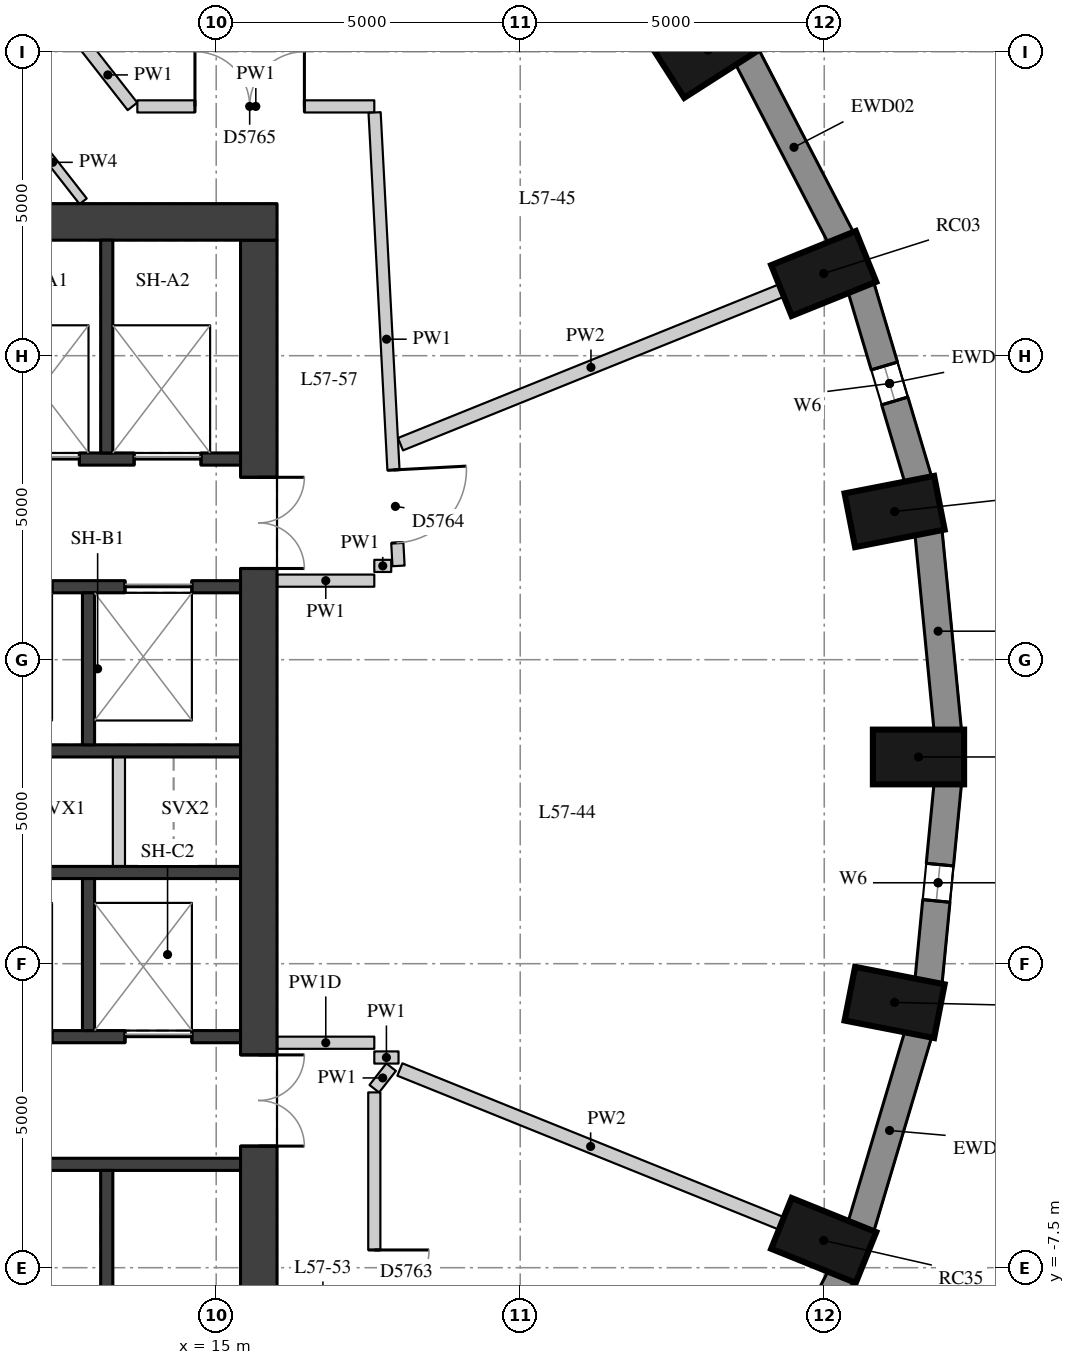
"""IFC4 building model, lengths in metres.
Left out: names, types, materials, properties, quantities, classifications, styles, units other than length and angle.
Written with IfcOpenShell. Run it as: python <this file> out.ifc"""

import sys

from ifc_helpers import new_model, si_unit, direction, frame, frame_2d, origin, origin_2d, place, context, subcontext, project, spatial, rectangle, extrude, element, fill, save


model = new_model("IFC4")
c1 = context("Model", 3, precision=1e-05, world=origin(), true_north=direction((0.0, 1.0)))
c2 = subcontext(c1, "Body", "Model", "MODEL_VIEW")
j1 = project(units=[si_unit("LENGTHUNIT", "METRE"), si_unit("PLANEANGLEUNIT", "RADIAN")], contexts=[c1])
p1 = place(None, origin())
s1 = spatial("IfcSite", under=j1, at=p1, CompositionType="ELEMENT")
p2 = place(p1, origin())
s2 = spatial("IfcBuilding", under=s1, at=p2, CompositionType="ELEMENT")
p3 = place(p2, frame((0.0, 0.0, 202.4)))
s3 = spatial("IfcBuildingStorey", under=s2, at=p3, CompositionType="ELEMENT", Elevation=202.4)
for number, where, z_axis, x_axis in (
    (1, (26.55, 0.9, 0.0), (0.0, 0.0, 1.0), (1.0, 0.0, 0.0)),
    (2, (26.157, 4.937, 0.0), (0.0, 0.0, 1.0), (0.981, 0.192, 0.0)),
    (3, (24.991, 8.852, 0.0), (0.0, 0.0, 1.0), (0.927, 0.374, 0.0)),
    (4, (23.087, 12.525, 0.0), (0.0, 0.0, 1.0), (0.842, 0.539, 0.0)),
    (5, (24.991, -7.052, 0.0), (0.0, 0.0, 1.0), (0.927, -0.374, 0.0)),
    (6, (26.157, -3.137, 0.0), (0.0, 0.0, 1.0), (0.981, -0.192, 0.0)),
):
    element("IfcColumn", number, at=place(p3, frame(where, z_axis=z_axis, x_axis=x_axis)), inside=s3, PredefinedType="COLUMN", context=c2, shape_type="SweptSolid", body=[
        extrude(rectangle(XDim=1.5, YDim=0.9, at=origin_2d()), origin(), (0.0, 0.0, 1.0), 3.3),
    ])
p4 = place(p3, frame((27.032, 1.33, 0.0), z_axis=(0.0, 0.0, 1.0), x_axis=(-0.096824116835, 0.995301507283, 0.0)))
e7 = element("IfcWall", 7, at=p4, inside=s3, PredefinedType="SOLIDWALL", context=c2, shape_type="SweptSolid", body=[
    extrude(rectangle(XDim=3.293, YDim=0.45, at=frame_2d((1.646, 0.0))), origin(), (0.0, 0.0, 1.0), 3.02),
])
p5 = place(p3, frame((26.548, 5.452, 0.0), z_axis=(0.0, 0.0, 1.0), x_axis=(-0.285444972963, 0.958395099847, 0.0)))
e8 = element("IfcWall", 8, at=p5, inside=s3, PredefinedType="SOLIDWALL", context=c2, shape_type="SweptSolid", body=[
    extrude(rectangle(XDim=3.32, YDim=0.45, at=frame_2d((1.66, 0.0))), origin(), (0.0, 0.0, 1.0), 3.02),
])
p6 = place(p5, frame((1.36, 0.0, 0.4)))
e9 = element("IfcOpeningElement", 9, at=p6, cuts=e8, PredefinedType="OPENING", context=c2, shape_type="SweptSolid", body=[
    extrude(rectangle(XDim=0.6, YDim=1.75, at=frame_2d((0.3, 0.875))), frame((0.0, 0.235, 0.0), z_axis=(0.0, -1.0, 0.0), x_axis=(1.0, 0.0, 0.0)), (0.0, 0.0, 1.0), 0.47),
])
p7 = place(p3, frame((25.278, 9.432, 0.0), z_axis=(0.0, 0.0, 1.0), x_axis=(-0.460175500475, 0.887827972505, 0.0)))
e10 = element("IfcWall", 10, at=p7, inside=s3, PredefinedType="SOLIDWALL", context=c2, shape_type="SweptSolid", body=[
    extrude(rectangle(XDim=3.371, YDim=0.45, at=frame_2d((1.685, 0.0))), origin(), (0.0, 0.0, 1.0), 3.02),
])
p8 = place(p3, frame((23.727, -10.624, 0.0), z_axis=(0.0, 0.0, 1.0), x_axis=(0.460175500475, 0.887827972505, 0.0)))
e11 = element("IfcWall", 11, at=p8, inside=s3, PredefinedType="SOLIDWALL", context=c2, shape_type="SweptSolid", body=[
    extrude(rectangle(XDim=3.371, YDim=0.45, at=frame_2d((1.685, 0.0))), origin(), (0.0, 0.0, 1.0), 3.02),
])
p9 = place(p8, frame((1.385, 0.0, 0.4)))
e12 = element("IfcOpeningElement", 12, at=p9, cuts=e11, PredefinedType="OPENING", context=c2, shape_type="SweptSolid", body=[
    extrude(rectangle(XDim=0.6, YDim=1.75, at=frame_2d((0.3, 0.875))), frame((0.0, 0.235, 0.0), z_axis=(0.0, -1.0, 0.0), x_axis=(1.0, 0.0, 0.0)), (0.0, 0.0, 1.0), 0.47),
])
p10 = place(p3, frame((25.6, -6.834, 0.0), z_axis=(0.0, 0.0, 1.0), x_axis=(0.285444972963, 0.958395099847, 0.0)))
e13 = element("IfcWall", 13, at=p10, inside=s3, PredefinedType="SOLIDWALL", context=c2, shape_type="SweptSolid", body=[
    extrude(rectangle(XDim=3.32, YDim=0.45, at=frame_2d((1.66, 0.0))), origin(), (0.0, 0.0, 1.0), 3.02),
])
p11 = place(p3, frame((26.713, -2.808, 0.0), z_axis=(0.0, 0.0, 1.0), x_axis=(0.096816972749, 0.995302202242, 0.0)))
e14 = element("IfcWall", 14, at=p11, inside=s3, PredefinedType="SOLIDWALL", context=c2, shape_type="SweptSolid", body=[
    extrude(rectangle(XDim=3.293, YDim=0.45, at=frame_2d((1.646, 0.0))), origin(), (0.0, 0.0, 1.0), 3.02),
])
p12 = place(p11, frame((1.347, 0.0, 0.4)))
e15 = element("IfcOpeningElement", 15, at=p12, cuts=e14, PredefinedType="OPENING", context=c2, shape_type="SweptSolid", body=[
    extrude(rectangle(XDim=0.6, YDim=1.75, at=frame_2d((0.3, 0.875))), frame((0.0, 0.235, 0.0), z_axis=(0.0, -1.0, 0.0), x_axis=(1.0, 0.0, 0.0)), (0.0, 0.0, 1.0), 0.47),
])
p13 = place(p3, frame((15.7, -9.4, 0.0), z_axis=(0.0, 0.0, 1.0), x_axis=(0.0, 1.0, 0.0)))
e16 = element("IfcWall", 16, at=p13, inside=s3, PredefinedType="SHEAR", context=c2, shape_type="SweptSolid", body=[
    extrude(rectangle(XDim=18.8, YDim=0.6, at=frame_2d((9.4, 0.0))), origin(), (0.0, 0.0, 1.0), 3.02),
])
p14 = place(p13, frame((13.4, 0.0, 0.0)))
e17 = element("IfcOpeningElement", 17, at=p14, cuts=e16, PredefinedType="OPENING", context=c2, shape_type="SweptSolid", body=[
    extrude(rectangle(XDim=1.5, YDim=2.1, at=frame_2d((0.75, 1.05))), frame((0.0, 0.31, 0.0), z_axis=(0.0, -1.0, 0.0), x_axis=(1.0, 0.0, 0.0)), (0.0, 0.0, 1.0), 0.62),
])
p15 = place(p13, frame((3.9, 0.0, 0.0)))
e18 = element("IfcOpeningElement", 18, at=p15, cuts=e16, PredefinedType="OPENING", context=c2, shape_type="SweptSolid", body=[
    extrude(rectangle(XDim=1.5, YDim=2.1, at=frame_2d((0.75, 1.05))), frame((0.0, 0.31, 0.0), z_axis=(0.0, -1.0, 0.0), x_axis=(1.0, 0.0, 0.0)), (0.0, 0.0, 1.0), 0.62),
])
p16 = place(p3, frame((4.0, 9.7, 0.0), z_axis=(0.0, 0.0, 1.0), x_axis=(1.0, 0.0, 0.0)))
e19 = element("IfcWall", 19, at=p16, inside=s3, PredefinedType="SHEAR", context=c2, shape_type="SweptSolid", body=[
    extrude(rectangle(XDim=12.0, YDim=0.6, at=frame_2d((6.0, 0.0))), origin(), (0.0, 0.0, 1.0), 3.02),
])
p17 = place(p3, frame((4.6, 5.8, 0.0), z_axis=(0.0, 0.0, 1.0), x_axis=(1.0, 0.0, 0.0)))
e20 = element("IfcWall", 20, at=p17, inside=s3, PredefinedType="SHEAR", context=c2, shape_type="SweptSolid", body=[
    extrude(rectangle(XDim=10.8, YDim=0.2, at=frame_2d((5.4, 0.0))), origin(), (0.0, 0.0, 1.0), 3.02),
])
p18 = place(p17, frame((7.05, 0.0, 0.0)))
e21 = element("IfcOpeningElement", 21, at=p18, cuts=e20, PredefinedType="OPENING", context=c2, shape_type="SweptSolid", body=[
    extrude(rectangle(XDim=1.1, YDim=2.1, at=frame_2d((0.55, 1.05))), frame((0.0, 0.11, 0.0), z_axis=(0.0, -1.0, 0.0), x_axis=(1.0, 0.0, 0.0)), (0.0, 0.0, 1.0), 0.22),
])
p19 = place(p17, frame((9.05, 0.0, 0.0)))
e22 = element("IfcOpeningElement", 22, at=p19, cuts=e20, PredefinedType="OPENING", context=c2, shape_type="SweptSolid", body=[
    extrude(rectangle(XDim=1.1, YDim=2.1, at=frame_2d((0.55, 1.05))), frame((0.0, 0.11, 0.0), z_axis=(0.0, -1.0, 0.0), x_axis=(1.0, 0.0, 0.0)), (0.0, 0.0, 1.0), 0.22),
])
p20 = place(p3, frame((4.6, 3.7, 0.0), z_axis=(0.0, 0.0, 1.0), x_axis=(1.0, 0.0, 0.0)))
e23 = element("IfcWall", 23, at=p20, inside=s3, PredefinedType="SHEAR", context=c2, shape_type="SweptSolid", body=[
    extrude(rectangle(XDim=10.8, YDim=0.2, at=frame_2d((5.4, 0.0))), origin(), (0.0, 0.0, 1.0), 3.02),
])
p21 = place(p20, frame((6.6, 0.0, 0.0)))
e24 = element("IfcOpeningElement", 24, at=p21, cuts=e23, PredefinedType="OPENING", context=c2, shape_type="SweptSolid", body=[
    extrude(rectangle(XDim=1.1, YDim=2.1, at=frame_2d((0.55, 1.05))), frame((0.0, 0.11, 0.0), z_axis=(0.0, -1.0, 0.0), x_axis=(1.0, 0.0, 0.0)), (0.0, 0.0, 1.0), 0.22),
])
p22 = place(p20, frame((8.9, 0.0, 0.0)))
e25 = element("IfcOpeningElement", 25, at=p22, cuts=e23, PredefinedType="OPENING", context=c2, shape_type="SweptSolid", body=[
    extrude(rectangle(XDim=1.1, YDim=2.1, at=frame_2d((0.55, 1.05))), frame((0.0, 0.11, 0.0), z_axis=(0.0, -1.0, 0.0), x_axis=(1.0, 0.0, 0.0)), (0.0, 0.0, 1.0), 0.22),
])
for number, where, z_axis, x_axis in (
    (26, (4.6, 1.0, 0.0), (0.0, 0.0, 1.0), (1.0, 0.0, 0.0)),
    (27, (4.6, -1.0, 0.0), (0.0, 0.0, 1.0), (1.0, 0.0, 0.0)),
):
    element("IfcWall", number, at=place(p3, frame(where, z_axis=z_axis, x_axis=x_axis)), inside=s3, PredefinedType="SHEAR", context=c2, shape_type="SweptSolid", body=[
        extrude(rectangle(XDim=10.8, YDim=0.2, at=frame_2d((5.4, 0.0))), origin(), (0.0, 0.0, 1.0), 3.02),
    ])
p23 = place(p3, frame((4.6, -3.7, 0.0), z_axis=(0.0, 0.0, 1.0), x_axis=(1.0, 0.0, 0.0)))
e28 = element("IfcWall", 28, at=p23, inside=s3, PredefinedType="SHEAR", context=c2, shape_type="SweptSolid", body=[
    extrude(rectangle(XDim=10.8, YDim=0.2, at=frame_2d((5.4, 0.0))), origin(), (0.0, 0.0, 1.0), 3.02),
])
p24 = place(p23, frame((6.6, 0.0, 0.0)))
e29 = element("IfcOpeningElement", 29, at=p24, cuts=e28, PredefinedType="OPENING", context=c2, shape_type="SweptSolid", body=[
    extrude(rectangle(XDim=1.1, YDim=2.1, at=frame_2d((0.55, 1.05))), frame((0.0, 0.11, 0.0), z_axis=(0.0, -1.0, 0.0), x_axis=(1.0, 0.0, 0.0)), (0.0, 0.0, 1.0), 0.22),
])
p25 = place(p23, frame((8.9, 0.0, 0.0)))
e30 = element("IfcOpeningElement", 30, at=p25, cuts=e28, PredefinedType="OPENING", context=c2, shape_type="SweptSolid", body=[
    extrude(rectangle(XDim=1.1, YDim=2.1, at=frame_2d((0.55, 1.05))), frame((0.0, 0.11, 0.0), z_axis=(0.0, -1.0, 0.0), x_axis=(1.0, 0.0, 0.0)), (0.0, 0.0, 1.0), 0.22),
])
p26 = place(p3, frame((4.6, -5.8, 0.0), z_axis=(0.0, 0.0, 1.0), x_axis=(1.0, 0.0, 0.0)))
e31 = element("IfcWall", 31, at=p26, inside=s3, PredefinedType="SHEAR", context=c2, shape_type="SweptSolid", body=[
    extrude(rectangle(XDim=10.8, YDim=0.2, at=frame_2d((5.4, 0.0))), origin(), (0.0, 0.0, 1.0), 3.02),
])
for number, where, z_axis, x_axis in (
    (32, (13.2, 5.9, 0.0), (0.0, 0.0, 1.0), (0.0, 1.0, 0.0)),
    (33, (13.2, -9.4, 0.0), (0.0, 0.0, 1.0), (0.0, 1.0, 0.0)),
):
    element("IfcWall", number, at=place(p3, frame(where, z_axis=z_axis, x_axis=x_axis)), inside=s3, PredefinedType="SHEAR", context=c2, shape_type="SweptSolid", body=[
        extrude(rectangle(XDim=3.5, YDim=0.2, at=frame_2d((1.75, 0.0))), origin(), (0.0, 0.0, 1.0), 3.02),
    ])
for number, where, z_axis, x_axis in (
    (34, (12.9, 1.1, 0.0), (0.0, 0.0, 1.0), (0.0, 1.0, 0.0)),
    (35, (12.9, -3.6, 0.0), (0.0, 0.0, 1.0), (0.0, 1.0, 0.0)),
):
    element("IfcWall", number, at=place(p3, frame(where, z_axis=z_axis, x_axis=x_axis)), inside=s3, PredefinedType="SHEAR", context=c2, shape_type="SweptSolid", body=[
        extrude(rectangle(XDim=2.5, YDim=0.2, at=frame_2d((1.25, 0.0))), origin(), (0.0, 0.0, 1.0), 3.02),
    ])
p27 = place(p3, frame((13.4, -0.9, 0.0), z_axis=(0.0, 0.0, 1.0), x_axis=(0.0, 1.0, 0.0)))
e36 = element("IfcWall", 36, at=p27, inside=s3, PredefinedType="PARTITIONING", context=c2, shape_type="SweptSolid", body=[
    extrude(rectangle(XDim=1.8, YDim=0.2, at=frame_2d((0.9, 0.0))), origin(), (0.0, 0.0, 1.0), 3.02),
])
p28 = place(p3, frame((17.6, -4.043, 0.0), z_axis=(0.0, 0.0, 1.0), x_axis=(1.0, 0.0, 0.0)))
e37 = element("IfcWall", 37, at=p28, inside=s3, PredefinedType="PARTITIONING", context=c2, shape_type="SweptSolid", body=[
    extrude(rectangle(XDim=0.398, YDim=0.2, at=frame_2d((0.199, 0.0))), origin(), (0.0, 0.0, 1.0), 3.02),
])
p29 = place(p3, frame((17.876, -4.201, 0.0), z_axis=(0.0, 0.0, 1.0), x_axis=(-0.61405326993, -0.789264582816, 0.0)))
e38 = element("IfcWall", 38, at=p29, inside=s3, PredefinedType="PARTITIONING", context=c2, shape_type="SweptSolid", body=[
    extrude(rectangle(XDim=0.45, YDim=0.2, at=frame_2d((0.225, 0.0))), origin(), (0.0, 0.0, 1.0), 3.02),
])
p30 = place(p3, frame((17.6, -4.617, 0.0), z_axis=(0.0, 0.0, 1.0), x_axis=(0.0, -1.0, 0.0)))
e39 = element("IfcWall", 39, at=p30, inside=s3, PredefinedType="PARTITIONING", context=c2, shape_type="SweptSolid", body=[
    extrude(rectangle(XDim=6.983, YDim=0.2, at=frame_2d((3.492, 0.0))), origin(), (0.0, 0.0, 1.0), 3.02),
])
p31 = place(p30, frame((2.592, 0.0, 0.0)))
e40 = element("IfcOpeningElement", 40, at=p31, cuts=e39, PredefinedType="OPENING", context=c2, shape_type="SweptSolid", body=[
    extrude(rectangle(XDim=1.8, YDim=2.1, at=frame_2d((0.9, 1.05))), frame((0.0, 0.11, 0.0), z_axis=(0.0, -1.0, 0.0), x_axis=(1.0, 0.0, 0.0)), (0.0, 0.0, 1.0), 0.22),
])
p32 = place(p3, frame((12.812, 12.636, 0.0), z_axis=(0.0, 0.0, 1.0), x_axis=(0.616123044723, -0.787649918277, 0.0)))
e41 = element("IfcWall", 41, at=p32, inside=s3, PredefinedType="PARTITIONING", context=c2, shape_type="SweptSolid", body=[
    extrude(rectangle(XDim=1.315, YDim=0.2, at=frame_2d((0.658, 0.0))), origin(), (0.0, 0.0, 1.0), 3.02),
])
p33 = place(p3, frame((13.703, 11.6, 0.0), z_axis=(0.0, 0.0, 1.0), x_axis=(1.0, 0.0, 0.0)))
e42 = element("IfcWall", 42, at=p33, inside=s3, PredefinedType="PARTITIONING", context=c2, shape_type="SweptSolid", body=[
    extrude(rectangle(XDim=3.897, YDim=0.2, at=frame_2d((1.949, 0.0))), origin(), (0.0, 0.0, 1.0), 3.02),
])
p34 = place(p33, frame((0.948, 0.0, 0.0)))
e43 = element("IfcOpeningElement", 43, at=p34, cuts=e42, PredefinedType="OPENING", context=c2, shape_type="SweptSolid", body=[
    extrude(rectangle(XDim=1.8, YDim=2.1, at=frame_2d((0.9, 1.05))), frame((0.0, 0.11, 0.0), z_axis=(0.0, -1.0, 0.0), x_axis=(1.0, 0.0, 0.0)), (0.0, 0.0, 1.0), 0.22),
])
p35 = place(p3, frame((17.605, 11.5, 0.0), z_axis=(0.0, 0.0, 1.0), x_axis=(0.052701255232, -0.998610323248, 0.0)))
e44 = element("IfcWall", 44, at=p35, inside=s3, PredefinedType="PARTITIONING", context=c2, shape_type="SweptSolid", body=[
    extrude(rectangle(XDim=7.468, YDim=0.2, at=frame_2d((3.734, 0.0))), origin(), (0.0, 0.0, 1.0), 3.02),
])
p36 = place(p35, frame((5.887, 0.0, 0.0)))
e45 = element("IfcOpeningElement", 45, at=p36, cuts=e44, PredefinedType="OPENING", context=c2, shape_type="SweptSolid", body=[
    extrude(rectangle(XDim=1.2, YDim=2.1, at=frame_2d((0.6, 1.05))), frame((0.0, 0.11, 0.0), z_axis=(0.0, -1.0, 0.0), x_axis=(1.0, 0.0, 0.0)), (0.0, 0.0, 1.0), 0.22),
])
p37 = place(p3, frame((17.878, 4.043, 0.0), z_axis=(0.0, 0.0, 1.0), x_axis=(-1.0, 0.0, 0.0)))
e46 = element("IfcWall", 46, at=p37, inside=s3, PredefinedType="PARTITIONING", context=c2, shape_type="SweptSolid", body=[
    extrude(rectangle(XDim=0.278, YDim=0.2, at=frame_2d((0.139, 0.0))), origin(), (0.0, 0.0, 1.0), 3.02),
])
p38 = place(p3, frame((17.6, 3.8, 0.0), z_axis=(0.0, 0.0, 1.0), x_axis=(-1.0, 0.0, 0.0)))
e47 = element("IfcWall", 47, at=p38, inside=s3, PredefinedType="PARTITIONING", context=c2, shape_type="SweptSolid", body=[
    extrude(rectangle(XDim=1.596, YDim=0.2, at=frame_2d((0.798, 0.0))), origin(), (0.0, 0.0, 1.0), 3.02),
])
p39 = place(p3, frame((16.004, -3.8, 0.0), z_axis=(0.0, 0.0, 1.0), x_axis=(1.0, 0.0, 0.0)))
e48 = element("IfcWall", 48, at=p39, inside=s3, PredefinedType="PARTITIONING", context=c2, shape_type="SweptSolid", body=[
    extrude(rectangle(XDim=1.596, YDim=0.2, at=frame_2d((0.798, 0.0))), origin(), (0.0, 0.0, 1.0), 2.47),
])
p40 = place(p3, frame((11.81, 11.321, 0.0), z_axis=(0.0, 0.0, 1.0), x_axis=(0.615964296608, -0.787774069962, 0.0)))
e49 = element("IfcWall", 49, at=p40, inside=s3, PredefinedType="PARTITIONING", context=c2, shape_type="SweptSolid", body=[
    extrude(rectangle(XDim=1.627, YDim=0.15, at=frame_2d((0.813, 0.0))), origin(), (0.0, 0.0, 1.0), 3.02),
])
p41 = place(p3, frame((24.295, 8.571, 0.0), z_axis=(0.0, 0.0, 1.0), x_axis=(-0.927395972896, -0.374081153571, 0.0)))
e50 = element("IfcWall", 50, at=p41, inside=s3, PredefinedType="PARTITIONING", context=c2, shape_type="SweptSolid", body=[
    extrude(rectangle(XDim=6.755, YDim=0.22, at=frame_2d((3.377, 0.0))), origin(), (0.0, 0.0, 1.0), 3.02),
])
p42 = place(p3, frame((24.295, -6.771, 0.0), z_axis=(0.0, 0.0, 1.0), x_axis=(-0.927382720906, 0.374114005305, 0.0)))
e51 = element("IfcWall", 51, at=p42, inside=s3, PredefinedType="PARTITIONING", context=c2, shape_type="SweptSolid", body=[
    extrude(rectangle(XDim=6.766, YDim=0.22, at=frame_2d((3.383, 0.0))), origin(), (0.0, 0.0, 1.0), 3.02),
])
p43 = place(p6, origin())
e52 = element("IfcWindow", 52, at=p43, inside=s3, PartitioningType="SINGLE_PANEL", PredefinedType="WINDOW", context=c2, shape_type="SweptSolid", body=[
    extrude(rectangle(XDim=0.6, YDim=1.75, at=frame_2d((0.3, 0.875))), frame((0.0, 0.035, 0.0), z_axis=(0.0, -1.0, 0.0), x_axis=(1.0, 0.0, 0.0)), (0.0, 0.0, 1.0), 0.06),
])
fill(e9, e52)
p44 = place(p12, origin())
e53 = element("IfcWindow", 53, at=p44, inside=s3, PartitioningType="SINGLE_PANEL", PredefinedType="WINDOW", context=c2, shape_type="SweptSolid", body=[
    extrude(rectangle(XDim=0.6, YDim=1.75, at=frame_2d((0.3, 0.875))), frame((0.0, 0.035, 0.0), z_axis=(0.0, -1.0, 0.0), x_axis=(1.0, 0.0, 0.0)), (0.0, 0.0, 1.0), 0.06),
])
fill(e15, e53)
p45 = place(p14, origin())
e54 = element("IfcDoor", 54, at=p45, inside=s3, OperationType="DOUBLE_DOOR_SINGLE_SWING", PredefinedType="DOOR", context=c2, shape_type="SweptSolid", body=[
    extrude(rectangle(XDim=1.5, YDim=2.1, at=frame_2d((0.75, 1.05))), frame((0.0, 0.025, 0.0), z_axis=(0.0, -1.0, 0.0), x_axis=(1.0, 0.0, 0.0)), (0.0, 0.0, 1.0), 0.05),
])
fill(e17, e54)
p46 = place(p15, origin())
e55 = element("IfcDoor", 55, at=p46, inside=s3, OperationType="DOUBLE_DOOR_SINGLE_SWING", PredefinedType="DOOR", context=c2, shape_type="SweptSolid", body=[
    extrude(rectangle(XDim=1.5, YDim=2.1, at=frame_2d((0.75, 1.05))), frame((0.0, 0.025, 0.0), z_axis=(0.0, -1.0, 0.0), x_axis=(1.0, 0.0, 0.0)), (0.0, 0.0, 1.0), 0.05),
])
fill(e18, e55)
p47 = place(p18, origin())
e56 = element("IfcDoor", 56, at=p47, inside=s3, OperationType="DOUBLE_DOOR_SLIDING", PredefinedType="DOOR", context=c2, shape_type="SweptSolid", body=[
    extrude(rectangle(XDim=1.1, YDim=2.1, at=frame_2d((0.55, 1.05))), frame((0.0, 0.025, 0.0), z_axis=(0.0, -1.0, 0.0), x_axis=(1.0, 0.0, 0.0)), (0.0, 0.0, 1.0), 0.05),
])
fill(e21, e56)
p48 = place(p19, origin())
e57 = element("IfcDoor", 57, at=p48, inside=s3, OperationType="DOUBLE_DOOR_SLIDING", PredefinedType="DOOR", context=c2, shape_type="SweptSolid", body=[
    extrude(rectangle(XDim=1.1, YDim=2.1, at=frame_2d((0.55, 1.05))), frame((0.0, 0.025, 0.0), z_axis=(0.0, -1.0, 0.0), x_axis=(1.0, 0.0, 0.0)), (0.0, 0.0, 1.0), 0.05),
])
fill(e22, e57)
p49 = place(p21, origin())
e58 = element("IfcDoor", 58, at=p49, inside=s3, OperationType="DOUBLE_DOOR_SLIDING", PredefinedType="DOOR", context=c2, shape_type="SweptSolid", body=[
    extrude(rectangle(XDim=1.1, YDim=2.1, at=frame_2d((0.55, 1.05))), frame((0.0, 0.025, 0.0), z_axis=(0.0, -1.0, 0.0), x_axis=(1.0, 0.0, 0.0)), (0.0, 0.0, 1.0), 0.05),
])
fill(e24, e58)
p50 = place(p22, origin())
e59 = element("IfcDoor", 59, at=p50, inside=s3, OperationType="DOUBLE_DOOR_SLIDING", PredefinedType="DOOR", context=c2, shape_type="SweptSolid", body=[
    extrude(rectangle(XDim=1.1, YDim=2.1, at=frame_2d((0.55, 1.05))), frame((0.0, 0.025, 0.0), z_axis=(0.0, -1.0, 0.0), x_axis=(1.0, 0.0, 0.0)), (0.0, 0.0, 1.0), 0.05),
])
fill(e25, e59)
p51 = place(p24, origin())
e60 = element("IfcDoor", 60, at=p51, inside=s3, OperationType="DOUBLE_DOOR_SLIDING", PredefinedType="DOOR", context=c2, shape_type="SweptSolid", body=[
    extrude(rectangle(XDim=1.1, YDim=2.1, at=frame_2d((0.55, 1.05))), frame((0.0, 0.025, 0.0), z_axis=(0.0, -1.0, 0.0), x_axis=(1.0, 0.0, 0.0)), (0.0, 0.0, 1.0), 0.05),
])
fill(e29, e60)
p52 = place(p25, origin())
e61 = element("IfcDoor", 61, at=p52, inside=s3, OperationType="DOUBLE_DOOR_SLIDING", PredefinedType="DOOR", context=c2, shape_type="SweptSolid", body=[
    extrude(rectangle(XDim=1.1, YDim=2.1, at=frame_2d((0.55, 1.05))), frame((0.0, 0.025, 0.0), z_axis=(0.0, -1.0, 0.0), x_axis=(1.0, 0.0, 0.0)), (0.0, 0.0, 1.0), 0.05),
])
fill(e30, e61)
p53 = place(p31, origin())
e62 = element("IfcDoor", 62, at=p53, inside=s3, OperationType="DOUBLE_DOOR_SINGLE_SWING", PredefinedType="DOOR", context=c2, shape_type="SweptSolid", body=[
    extrude(rectangle(XDim=1.8, YDim=2.1, at=frame_2d((0.9, 1.05))), frame((0.0, 0.025, 0.0), z_axis=(0.0, -1.0, 0.0), x_axis=(1.0, 0.0, 0.0)), (0.0, 0.0, 1.0), 0.05),
])
fill(e40, e62)
p54 = place(p36, origin())
e63 = element("IfcDoor", 63, at=p54, inside=s3, OperationType="SINGLE_SWING_LEFT", PredefinedType="DOOR", context=c2, shape_type="SweptSolid", body=[
    extrude(rectangle(XDim=1.2, YDim=2.1, at=frame_2d((0.6, 1.05))), frame((0.0, 0.025, 0.0), z_axis=(0.0, -1.0, 0.0), x_axis=(1.0, 0.0, 0.0)), (0.0, 0.0, 1.0), 0.05),
])
fill(e45, e63)
p55 = place(p34, origin())
e64 = element("IfcDoor", 64, at=p55, inside=s3, OperationType="DOUBLE_DOOR_SINGLE_SWING", PredefinedType="DOOR", context=c2, shape_type="SweptSolid", body=[
    extrude(rectangle(XDim=1.8, YDim=2.1, at=frame_2d((0.9, 1.05))), frame((0.0, 0.025, 0.0), z_axis=(0.0, -1.0, 0.0), x_axis=(1.0, 0.0, 0.0)), (0.0, 0.0, 1.0), 0.05),
])
fill(e43, e64)
save(model, sys.argv[1])
